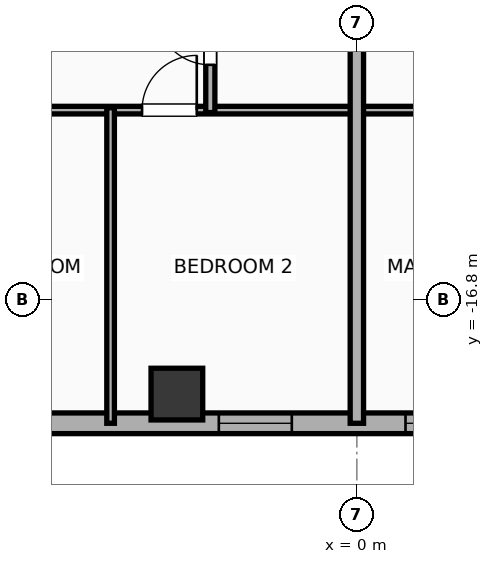
"""IFC4 building model, lengths in metres.
Left out: names, types, materials, properties, quantities, classifications, styles, units other than length and angle.
Written with IfcOpenShell. Run it as: python <this file> out.ifc"""

import sys

from ifc_helpers import new_model, si_unit, direction, frame, frame_2d, origin, origin_2d, place, context, subcontext, project, spatial, rectangle, hollow_rectangle, extrude, element, fill, save


model = new_model("IFC4")
c1 = context("Model", 3, precision=1e-05, world=origin(), true_north=direction((0.0, 1.0)))
c2 = subcontext(c1, "Body", "Model", "MODEL_VIEW")
j1 = project(units=[si_unit("LENGTHUNIT", "METRE"), si_unit("PLANEANGLEUNIT", "RADIAN")], contexts=[c1])
p1 = place(None, origin())
s1 = spatial("IfcSite", under=j1, at=p1, CompositionType="ELEMENT")
p2 = place(p1, origin())
s2 = spatial("IfcBuilding", under=s1, at=p2, CompositionType="ELEMENT")
p3 = place(p2, frame((0.0, 0.0, 239.2)))
s3 = spatial("IfcBuildingStorey", under=s2, at=p3, CompositionType="ELEMENT", Elevation=239.2)
p4 = place(p3, frame((-2.96, -18.35, 0.0), z_axis=(0.0, 0.0, 1.0), x_axis=(1.0, 0.0, 0.0)))
e1 = element("IfcColumn", 1, at=p4, inside=s3, PredefinedType="COLUMN", context=c2, shape_type="SweptSolid", body=[
    extrude(hollow_rectangle(XDim=0.85, YDim=0.85, WallThickness=0.028, at=origin_2d()), origin(), (0.0, 0.0, 1.0), 3.9),
])
p5 = place(p3, frame((26.783, -18.83, 0.0), z_axis=(0.0, 0.0, 1.0), x_axis=(-1.0, 0.0, 0.0)))
e2 = element("IfcWall", 2, at=p5, inside=s3, PredefinedType="ELEMENTEDWALL", context=c2, shape_type="SweptSolid", body=[
    extrude(rectangle(XDim=49.566, YDim=0.34, at=frame_2d((24.783, 0.0))), origin(), (0.0, 0.0, 1.0), 3.65),
])
p6 = place(p5, frame((23.583, 0.0, 0.75)))
e3 = element("IfcOpeningElement", 3, at=p6, cuts=e2, PredefinedType="OPENING", context=c2, shape_type="SweptSolid", body=[
    extrude(rectangle(XDim=2.4, YDim=2.1, at=frame_2d((1.2, 1.05))), frame((0.0, 0.18, 0.0), z_axis=(0.0, -1.0, 0.0), x_axis=(1.0, 0.0, 0.0)), (0.0, 0.0, 1.0), 0.36),
])
p7 = place(p5, frame((41.756, 0.0, 0.75)))
e4 = element("IfcOpeningElement", 4, at=p7, cuts=e2, PredefinedType="OPENING", context=c2, shape_type="SweptSolid", body=[
    extrude(rectangle(XDim=2.4, YDim=2.1, at=frame_2d((1.2, 1.05))), frame((0.0, 0.18, 0.0), z_axis=(0.0, -1.0, 0.0), x_axis=(1.0, 0.0, 0.0)), (0.0, 0.0, 1.0), 0.36),
])
p8 = place(p5, frame((47.222, 0.0, 0.75)))
e5 = element("IfcOpeningElement", 5, at=p8, cuts=e2, PredefinedType="OPENING", context=c2, shape_type="SweptSolid", body=[
    extrude(rectangle(XDim=1.2, YDim=2.05, at=frame_2d((0.6, 1.025))), frame((0.0, 0.18, 0.0), z_axis=(0.0, -1.0, 0.0), x_axis=(1.0, 0.0, 0.0)), (0.0, 0.0, 1.0), 0.36),
])
p9 = place(p5, frame((45.263, 0.0, 0.75)))
e6 = element("IfcOpeningElement", 6, at=p9, cuts=e2, PredefinedType="OPENING", context=c2, shape_type="SweptSolid", body=[
    extrude(rectangle(XDim=1.2, YDim=2.05, at=frame_2d((0.6, 1.025))), frame((0.0, 0.18, 0.0), z_axis=(0.0, -1.0, 0.0), x_axis=(1.0, 0.0, 0.0)), (0.0, 0.0, 1.0), 0.36),
])
p10 = place(p5, frame((37.289, 0.0, 0.75)))
e7 = element("IfcOpeningElement", 7, at=p10, cuts=e2, PredefinedType="OPENING", context=c2, shape_type="SweptSolid", body=[
    extrude(rectangle(XDim=1.2, YDim=2.05, at=frame_2d((0.6, 1.025))), frame((0.0, 0.18, 0.0), z_axis=(0.0, -1.0, 0.0), x_axis=(1.0, 0.0, 0.0)), (0.0, 0.0, 1.0), 0.36),
])
p11 = place(p5, frame((16.115, 0.0, 0.75)))
e8 = element("IfcOpeningElement", 8, at=p11, cuts=e2, PredefinedType="OPENING", context=c2, shape_type="SweptSolid", body=[
    extrude(rectangle(XDim=1.2, YDim=2.05, at=frame_2d((0.6, 1.025))), frame((0.0, 0.18, 0.0), z_axis=(0.0, -1.0, 0.0), x_axis=(1.0, 0.0, 0.0)), (0.0, 0.0, 1.0), 0.36),
])
p12 = place(p5, frame((12.422, 0.0, 0.75)))
e9 = element("IfcOpeningElement", 9, at=p12, cuts=e2, PredefinedType="OPENING", context=c2, shape_type="SweptSolid", body=[
    extrude(rectangle(XDim=1.2, YDim=2.05, at=frame_2d((0.6, 1.025))), frame((0.0, 0.18, 0.0), z_axis=(0.0, -1.0, 0.0), x_axis=(1.0, 0.0, 0.0)), (0.0, 0.0, 1.0), 0.36),
])
p13 = place(p5, frame((8.01, 0.0, 0.75)))
e10 = element("IfcOpeningElement", 10, at=p13, cuts=e2, PredefinedType="OPENING", context=c2, shape_type="SweptSolid", body=[
    extrude(rectangle(XDim=1.2, YDim=2.05, at=frame_2d((0.6, 1.025))), frame((0.0, 0.18, 0.0), z_axis=(0.0, -1.0, 0.0), x_axis=(1.0, 0.0, 0.0)), (0.0, 0.0, 1.0), 0.36),
])
p14 = place(p5, frame((5.037, 0.0, 0.75)))
e11 = element("IfcOpeningElement", 11, at=p14, cuts=e2, PredefinedType="OPENING", context=c2, shape_type="SweptSolid", body=[
    extrude(rectangle(XDim=1.2, YDim=2.05, at=frame_2d((0.6, 1.025))), frame((0.0, 0.18, 0.0), z_axis=(0.0, -1.0, 0.0), x_axis=(1.0, 0.0, 0.0)), (0.0, 0.0, 1.0), 0.36),
])
p15 = place(p5, frame((1.811, 0.0, 0.75)))
e12 = element("IfcOpeningElement", 12, at=p15, cuts=e2, PredefinedType="OPENING", context=c2, shape_type="SweptSolid", body=[
    extrude(rectangle(XDim=1.2, YDim=2.05, at=frame_2d((0.6, 1.025))), frame((0.0, 0.18, 0.0), z_axis=(0.0, -1.0, 0.0), x_axis=(1.0, 0.0, 0.0)), (0.0, 0.0, 1.0), 0.36),
])
p16 = place(p5, frame((32.253, 0.0, 0.75)))
e13 = element("IfcOpeningElement", 13, at=p16, cuts=e2, PredefinedType="OPENING", context=c2, shape_type="SweptSolid", body=[
    extrude(rectangle(XDim=1.2, YDim=2.05, at=frame_2d((0.6, 1.025))), frame((0.0, 0.18, 0.0), z_axis=(0.0, -1.0, 0.0), x_axis=(1.0, 0.0, 0.0)), (0.0, 0.0, 1.0), 0.36),
])
p17 = place(p5, frame((27.853, 0.0, 0.75)))
e14 = element("IfcOpeningElement", 14, at=p17, cuts=e2, PredefinedType="OPENING", context=c2, shape_type="SweptSolid", body=[
    extrude(rectangle(XDim=1.2, YDim=2.05, at=frame_2d((0.6, 1.025))), frame((0.0, 0.18, 0.0), z_axis=(0.0, -1.0, 0.0), x_axis=(1.0, 0.0, 0.0)), (0.0, 0.0, 1.0), 0.36),
])
p18 = place(p5, frame((20.473, 0.0, 0.75)))
e15 = element("IfcOpeningElement", 15, at=p18, cuts=e2, PredefinedType="OPENING", context=c2, shape_type="SweptSolid", body=[
    extrude(rectangle(XDim=1.2, YDim=2.05, at=frame_2d((0.6, 1.025))), frame((0.0, 0.18, 0.0), z_axis=(0.0, -1.0, 0.0), x_axis=(1.0, 0.0, 0.0)), (0.0, 0.0, 1.0), 0.36),
])
p19 = place(p3, frame((-8.08, -13.68, 0.0), z_axis=(0.0, 0.0, 1.0), x_axis=(1.0, 0.0, 0.0)))
e16 = element("IfcWall", 16, at=p19, inside=s3, PredefinedType="PARTITIONING", context=c2, shape_type="SweptSolid", body=[
    extrude(rectangle(XDim=8.06, YDim=0.125, at=frame_2d((4.03, 0.0))), origin(), (0.0, 0.0, 1.0), 3.65),
])
p20 = place(p19, frame((1.323, 0.0, 0.0)))
e17 = element("IfcOpeningElement", 17, at=p20, cuts=e16, PredefinedType="OPENING", context=c2, shape_type="SweptSolid", body=[
    extrude(rectangle(XDim=0.9, YDim=2.05, at=frame_2d((0.45, 1.025))), frame((0.0, 0.073, 0.0), z_axis=(0.0, -1.0, 0.0), x_axis=(1.0, 0.0, 0.0)), (0.0, 0.0, 1.0), 0.145),
])
p21 = place(p19, frame((4.547, 0.0, 0.0)))
e18 = element("IfcOpeningElement", 18, at=p21, cuts=e16, PredefinedType="OPENING", context=c2, shape_type="SweptSolid", body=[
    extrude(rectangle(XDim=0.9, YDim=2.05, at=frame_2d((0.45, 1.025))), frame((0.0, 0.073, 0.0), z_axis=(0.0, -1.0, 0.0), x_axis=(1.0, 0.0, 0.0)), (0.0, 0.0, 1.0), 0.145),
])
p22 = place(p3, frame((-2.41, -13.72, 0.0), z_axis=(0.0, 0.0, 1.0), x_axis=(0.0, 1.0, 0.0)))
e19 = element("IfcWall", 19, at=p22, inside=s3, PredefinedType="PLUMBINGWALL", context=c2, shape_type="SweptSolid", body=[
    extrude(rectangle(XDim=2.47, YDim=0.15, at=frame_2d((1.235, 0.0))), origin(), (0.0, 0.0, 1.0), 3.65),
])
p23 = place(p22, frame((0.785, 0.0, 0.0)))
e20 = element("IfcOpeningElement", 20, at=p23, cuts=e19, PredefinedType="OPENING", context=c2, shape_type="SweptSolid", body=[
    extrude(rectangle(XDim=0.9, YDim=2.05, at=frame_2d((0.45, 1.025))), frame((0.0, 0.085, 0.0), z_axis=(0.0, -1.0, 0.0), x_axis=(1.0, 0.0, 0.0)), (0.0, 0.0, 1.0), 0.17),
])
p24 = place(p3, frame((-4.05, -18.83, 0.0), z_axis=(0.0, 0.0, 1.0), x_axis=(0.0, 1.0, 0.0)))
e21 = element("IfcWall", 21, at=p24, inside=s3, PredefinedType="PARTITIONING", context=c2, shape_type="SweptSolid", body=[
    extrude(rectangle(XDim=5.19, YDim=0.125, at=frame_2d((2.595, 0.0))), origin(), (0.0, 0.0, 1.0), 3.65),
])
p25 = place(p3, frame((0.02, -13.68, 0.0), z_axis=(0.0, 0.0, 1.0), x_axis=(1.0, 0.0, 0.0)))
e22 = element("IfcWall", 22, at=p25, inside=s3, PredefinedType="PARTITIONING", context=c2, shape_type="SweptSolid", body=[
    extrude(rectangle(XDim=8.06, YDim=0.125, at=frame_2d((4.03, 0.0))), origin(), (0.0, 0.0, 1.0), 3.65),
])
p26 = place(p25, frame((1.323, 0.0, 0.0)))
e23 = element("IfcOpeningElement", 23, at=p26, cuts=e22, PredefinedType="OPENING", context=c2, shape_type="SweptSolid", body=[
    extrude(rectangle(XDim=0.9, YDim=2.05, at=frame_2d((0.45, 1.025))), frame((0.0, 0.073, 0.0), z_axis=(0.0, -1.0, 0.0), x_axis=(1.0, 0.0, 0.0)), (0.0, 0.0, 1.0), 0.145),
])
p27 = place(p25, frame((5.837, 0.0, 0.0)))
e24 = element("IfcOpeningElement", 24, at=p27, cuts=e22, PredefinedType="OPENING", context=c2, shape_type="SweptSolid", body=[
    extrude(rectangle(XDim=0.9, YDim=2.05, at=frame_2d((0.45, 1.025))), frame((0.0, 0.073, 0.0), z_axis=(0.0, -1.0, 0.0), x_axis=(1.0, 0.0, 0.0)), (0.0, 0.0, 1.0), 0.145),
])
p28 = place(p3, frame((0.0, -18.83, 0.0), z_axis=(0.0, 0.0, 1.0), x_axis=(0.0, 1.0, 0.0)))
e25 = element("IfcWall", 25, at=p28, inside=s3, PredefinedType="PARTITIONING", context=c2, shape_type="SweptSolid", body=[
    extrude(rectangle(XDim=9.99, YDim=0.22, at=frame_2d((4.995, 0.0))), origin(), (0.0, 0.0, 1.0), 3.65),
])
p29 = place(p6, origin())
e26 = element("IfcWindow", 26, at=p29, inside=s3, PartitioningType="SINGLE_PANEL", PredefinedType="WINDOW", context=c2, shape_type="SweptSolid", body=[
    extrude(rectangle(XDim=2.4, YDim=2.1, at=frame_2d((1.2, 1.05))), frame((0.0, 0.03, 0.0), z_axis=(0.0, -1.0, 0.0), x_axis=(1.0, 0.0, 0.0)), (0.0, 0.0, 1.0), 0.06),
])
fill(e3, e26)
p30 = place(p17, origin())
e27 = element("IfcWindow", 27, at=p30, inside=s3, PartitioningType="SINGLE_PANEL", PredefinedType="WINDOW", context=c2, shape_type="SweptSolid", body=[
    extrude(rectangle(XDim=1.2, YDim=2.05, at=frame_2d((0.6, 1.025))), frame((0.0, 0.03, 0.0), z_axis=(0.0, -1.0, 0.0), x_axis=(1.0, 0.0, 0.0)), (0.0, 0.0, 1.0), 0.06),
])
fill(e14, e27)
p31 = place(p21, origin())
e28 = element("IfcDoor", 28, at=p31, inside=s3, OperationType="SINGLE_SWING_RIGHT", PredefinedType="DOOR", context=c2, shape_type="SweptSolid", body=[
    extrude(rectangle(XDim=0.9, YDim=2.05, at=frame_2d((0.45, 1.025))), frame((0.0, 0.025, 0.0), z_axis=(0.0, -1.0, 0.0), x_axis=(1.0, 0.0, 0.0)), (0.0, 0.0, 1.0), 0.05),
])
fill(e18, e28)
p32 = place(p23, origin())
e29 = element("IfcDoor", 29, at=p32, inside=s3, OperationType="SINGLE_SWING_RIGHT", PredefinedType="DOOR", context=c2, shape_type="SweptSolid", body=[
    extrude(rectangle(XDim=0.9, YDim=2.05, at=frame_2d((0.45, 1.025))), frame((0.0, 0.025, 0.0), z_axis=(0.0, -1.0, 0.0), x_axis=(1.0, 0.0, 0.0)), (0.0, 0.0, 1.0), 0.05),
])
fill(e20, e29)
save(model, sys.argv[1])
